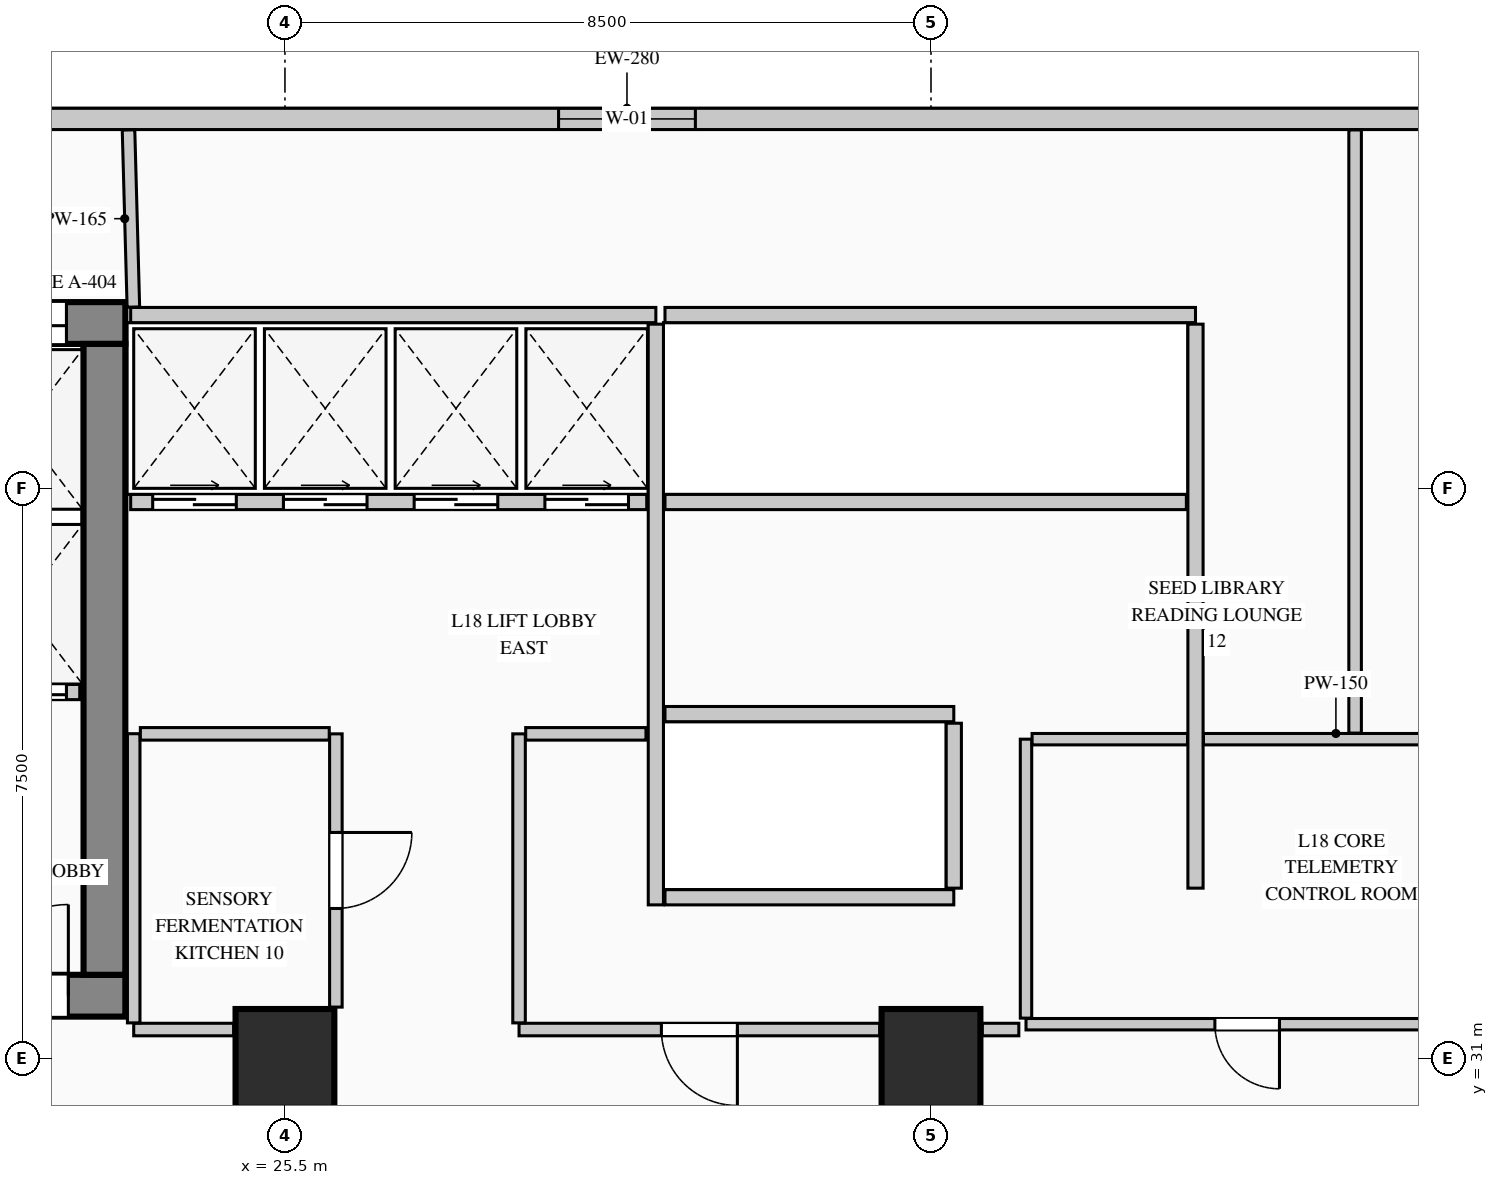
"""IFC4 building model, lengths in metres.
Left out: names, types, materials, properties, quantities, classifications, styles, units other than length and angle.
Written with IfcOpenShell. Run it as: python <this file> out.ifc"""

import sys

from ifc_helpers import new_model, si_unit, direction, frame, frame_2d, origin, origin_2d, place, context, subcontext, project, spatial, rectangle, extrude, element, fill, save


model = new_model("IFC4")
c1 = context("Model", 3, precision=1e-05, world=origin(), true_north=direction((0.0, 1.0)))
c2 = subcontext(c1, "Body", "Model", "MODEL_VIEW")
j1 = project(units=[si_unit("LENGTHUNIT", "METRE"), si_unit("PLANEANGLEUNIT", "RADIAN")], contexts=[c1])
p1 = place(None, origin())
s1 = spatial("IfcSite", under=j1, at=p1, CompositionType="ELEMENT")
p2 = place(p1, origin())
s2 = spatial("IfcBuilding", under=s1, at=p2, CompositionType="ELEMENT")
p3 = place(p2, frame((0.0, 0.0, 79.8)))
s3 = spatial("IfcBuildingStorey", under=s2, at=p3, CompositionType="ELEMENT", Elevation=79.8)
p4 = place(p3, frame((5.45, 40.675, 0.0), z_axis=(0.0, 0.0, 1.0), x_axis=(1.0, 0.0, 0.0)))
e1 = element("IfcWall", 1, at=p4, inside=s3, PredefinedType="SHEAR", context=c2, shape_type="SweptSolid", body=[
    extrude(rectangle(XDim=17.95, YDim=0.55, at=frame_2d((8.975, 0.0))), origin(), (0.0, 0.0, 1.0), 4.4),
])
p5 = place(p4, frame((15.995, 0.0, 0.0)))
e2 = element("IfcOpeningElement", 2, at=p5, cuts=e1, PredefinedType="OPENING", context=c2, shape_type="SweptSolid", body=[
    extrude(rectangle(XDim=1.18, YDim=2.25, at=frame_2d((0.59, 1.125))), frame((0.0, 0.285, 0.0), z_axis=(0.0, -1.0, 0.0), x_axis=(1.0, 0.0, 0.0)), (0.0, 0.0, 1.0), 0.57),
])
p6 = place(p3, frame((5.45, 31.825, 0.0), z_axis=(0.0, 0.0, 1.0), x_axis=(1.0, 0.0, 0.0)))
e3 = element("IfcWall", 3, at=p6, inside=s3, PredefinedType="SHEAR", context=c2, shape_type="SweptSolid", body=[
    extrude(rectangle(XDim=17.95, YDim=0.55, at=frame_2d((8.975, 0.0))), origin(), (0.0, 0.0, 1.0), 4.4),
])
p7 = place(p6, frame((3.2, 0.0, 0.0)))
e4 = element("IfcOpeningElement", 4, at=p7, cuts=e3, PredefinedType="OPENING", context=c2, shape_type="SweptSolid", body=[
    extrude(rectangle(XDim=1.2, YDim=2.2, at=frame_2d((0.6, 1.1))), frame((0.0, 0.285, 0.0), z_axis=(0.0, -1.0, 0.0), x_axis=(1.0, 0.0, 0.0)), (0.0, 0.0, 1.0), 0.57),
])
p8 = place(p6, frame((7.05, 0.0, 0.0)))
e5 = element("IfcOpeningElement", 5, at=p8, cuts=e3, PredefinedType="OPENING", context=c2, shape_type="SweptSolid", body=[
    extrude(rectangle(XDim=1.2, YDim=2.2, at=frame_2d((0.6, 1.1))), frame((0.0, 0.285, 0.0), z_axis=(0.0, -1.0, 0.0), x_axis=(1.0, 0.0, 0.0)), (0.0, 0.0, 1.0), 0.57),
])
p9 = place(p6, frame((8.9, 0.0, 0.0)))
e6 = element("IfcOpeningElement", 6, at=p9, cuts=e3, PredefinedType="OPENING", context=c2, shape_type="SweptSolid", body=[
    extrude(rectangle(XDim=1.15, YDim=2.2, at=frame_2d((0.575, 1.1))), frame((0.0, 0.285, 0.0), z_axis=(0.0, -1.0, 0.0), x_axis=(1.0, 0.0, 0.0)), (0.0, 0.0, 1.0), 0.57),
])
p10 = place(p6, frame((16.0, 0.0, 0.0)))
e7 = element("IfcOpeningElement", 7, at=p10, cuts=e3, PredefinedType="OPENING", context=c2, shape_type="SweptSolid", body=[
    extrude(rectangle(XDim=1.2, YDim=2.2, at=frame_2d((0.6, 1.1))), frame((0.0, 0.285, 0.0), z_axis=(0.0, -1.0, 0.0), x_axis=(1.0, 0.0, 0.0)), (0.0, 0.0, 1.0), 0.57),
])
p11 = place(p3, frame((23.125, 32.1, 0.0), z_axis=(0.0, 0.0, 1.0), x_axis=(0.0, 1.0, 0.0)))
e8 = element("IfcWall", 8, at=p11, inside=s3, PredefinedType="SHEAR", context=c2, shape_type="SweptSolid", body=[
    extrude(rectangle(XDim=8.3, YDim=0.55, at=frame_2d((4.15, 0.0))), origin(), (0.0, 0.0, 1.0), 4.4),
])
for number, where, z_axis, x_axis in (
    (9, (25.5, 31.0, 0.0), (0.0, 0.0, 1.0), (1.0, 0.0, 0.0)),
    (10, (34.0, 31.0, 0.0), (0.0, 0.0, 1.0), (1.0, 0.0, 0.0)),
):
    element("IfcColumn", number, at=place(p3, frame(where, z_axis=z_axis, x_axis=x_axis)), inside=s3, PredefinedType="COLUMN", context=c2, shape_type="SweptSolid", body=[
        extrude(rectangle(XDim=1.3, YDim=1.3, at=origin_2d()), origin(), (0.0, 0.0, 1.0), 4.4),
    ])
p12 = place(p3, frame((4.84, 43.36, 0.0), z_axis=(0.0, 0.0, 1.0), x_axis=(1.0, 0.0, 0.0)))
e11 = element("IfcWall", 11, at=p12, inside=s3, PredefinedType="STANDARD", context=c2, shape_type="SweptSolid", body=[
    extrude(rectangle(XDim=50.32, YDim=0.28, at=frame_2d((25.16, 0.0))), origin(), (0.0, 0.0, 1.0), 4.115),
])
p13 = place(p12, frame((24.26, 0.0, 0.9)))
e12 = element("IfcOpeningElement", 12, at=p13, cuts=e11, PredefinedType="OPENING", context=c2, shape_type="SweptSolid", body=[
    extrude(rectangle(XDim=1.8, YDim=2.1, at=frame_2d((0.9, 1.05))), frame((0.0, 0.15, 0.0), z_axis=(0.0, -1.0, 0.0), x_axis=(1.0, 0.0, 0.0)), (0.0, 0.0, 1.0), 0.3),
])
p14 = place(p3, frame((21.3, 35.82, 0.0), z_axis=(0.0, 0.0, 1.0), x_axis=(1.0, 0.0, 0.0)))
e13 = element("IfcWall", 13, at=p14, inside=s3, PredefinedType="PARTITIONING", context=c2, shape_type="SweptSolid", body=[
    extrude(rectangle(XDim=1.5, YDim=0.2, at=frame_2d((0.75, 0.0))), origin(), (0.0, 0.0, 1.0), 4.115),
])
p15 = place(p14, frame((0.145, 0.0, 0.0)))
e14 = element("IfcOpeningElement", 14, at=p15, cuts=e13, PredefinedType="OPENING", context=c2, shape_type="SweptSolid", body=[
    extrude(rectangle(XDim=1.18, YDim=2.25, at=frame_2d((0.59, 1.125))), frame((0.0, 0.11, 0.0), z_axis=(0.0, -1.0, 0.0), x_axis=(1.0, 0.0, 0.0)), (0.0, 0.0, 1.0), 0.22),
])
p16 = place(p3, frame((23.47, 40.78, 0.0), z_axis=(0.0, 0.0, 1.0), x_axis=(1.0, 0.0, 0.0)))
e15 = element("IfcWall", 15, at=p16, inside=s3, PredefinedType="PARTITIONING", context=c2, shape_type="SweptSolid", body=[
    extrude(rectangle(XDim=6.91, YDim=0.2, at=frame_2d((3.455, 0.0))), origin(), (0.0, 0.0, 1.0), 4.115),
])
p17 = place(p3, frame((30.38, 33.02, 0.0), z_axis=(0.0, 0.0, 1.0), x_axis=(0.0, 1.0, 0.0)))
e16 = element("IfcWall", 16, at=p17, inside=s3, PredefinedType="PARTITIONING", context=c2, shape_type="SweptSolid", body=[
    extrude(rectangle(XDim=7.64, YDim=0.2, at=frame_2d((3.82, 0.0))), origin(), (0.0, 0.0, 1.0), 4.115),
])
p18 = place(p3, frame((23.47, 38.32, 0.0), z_axis=(0.0, 0.0, 1.0), x_axis=(1.0, 0.0, 0.0)))
e17 = element("IfcWall", 17, at=p18, inside=s3, PredefinedType="PARTITIONING", context=c2, shape_type="SweptSolid", body=[
    extrude(rectangle(XDim=6.79, YDim=0.2, at=frame_2d((3.395, 0.0))), origin(), (0.0, 0.0, 1.0), 4.115),
])
p19 = place(p18, frame((0.29, 0.0, 0.0)))
e18 = element("IfcOpeningElement", 18, at=p19, cuts=e17, PredefinedType="OPENING", context=c2, shape_type="SweptSolid", body=[
    extrude(rectangle(XDim=1.1, YDim=2.2, at=frame_2d((0.55, 1.1))), frame((0.0, 0.11, 0.0), z_axis=(0.0, -1.0, 0.0), x_axis=(1.0, 0.0, 0.0)), (0.0, 0.0, 1.0), 0.22),
])
p20 = place(p18, frame((2.01, 0.0, 0.0)))
e19 = element("IfcOpeningElement", 19, at=p20, cuts=e17, PredefinedType="OPENING", context=c2, shape_type="SweptSolid", body=[
    extrude(rectangle(XDim=1.1, YDim=2.2, at=frame_2d((0.55, 1.1))), frame((0.0, 0.11, 0.0), z_axis=(0.0, -1.0, 0.0), x_axis=(1.0, 0.0, 0.0)), (0.0, 0.0, 1.0), 0.22),
])
p21 = place(p18, frame((3.73, 0.0, 0.0)))
e20 = element("IfcOpeningElement", 20, at=p21, cuts=e17, PredefinedType="OPENING", context=c2, shape_type="SweptSolid", body=[
    extrude(rectangle(XDim=1.1, YDim=2.2, at=frame_2d((0.55, 1.1))), frame((0.0, 0.11, 0.0), z_axis=(0.0, -1.0, 0.0), x_axis=(1.0, 0.0, 0.0)), (0.0, 0.0, 1.0), 0.22),
])
p22 = place(p18, frame((5.45, 0.0, 0.0)))
e21 = element("IfcOpeningElement", 21, at=p22, cuts=e17, PredefinedType="OPENING", context=c2, shape_type="SweptSolid", body=[
    extrude(rectangle(XDim=1.1, YDim=2.2, at=frame_2d((0.55, 1.1))), frame((0.0, 0.11, 0.0), z_axis=(0.0, -1.0, 0.0), x_axis=(1.0, 0.0, 0.0)), (0.0, 0.0, 1.0), 0.22),
])
p23 = place(p3, frame((30.5, 40.78, 0.0), z_axis=(0.0, 0.0, 1.0), x_axis=(1.0, 0.0, 0.0)))
e22 = element("IfcWall", 22, at=p23, inside=s3, PredefinedType="PARTITIONING", context=c2, shape_type="SweptSolid", body=[
    extrude(rectangle(XDim=6.98, YDim=0.2, at=frame_2d((3.49, 0.0))), origin(), (0.0, 0.0, 1.0), 4.115),
])
p24 = place(p3, frame((37.48, 33.24, 0.0), z_axis=(0.0, 0.0, 1.0), x_axis=(0.0, 1.0, 0.0)))
e23 = element("IfcWall", 23, at=p24, inside=s3, PredefinedType="PARTITIONING", context=c2, shape_type="SweptSolid", body=[
    extrude(rectangle(XDim=7.42, YDim=0.2, at=frame_2d((3.71, 0.0))), origin(), (0.0, 0.0, 1.0), 4.115),
])
p25 = place(p3, frame((30.5, 38.32, 0.0), z_axis=(0.0, 0.0, 1.0), x_axis=(1.0, 0.0, 0.0)))
e24 = element("IfcWall", 24, at=p25, inside=s3, PredefinedType="PARTITIONING", context=c2, shape_type="SweptSolid", body=[
    extrude(rectangle(XDim=6.86, YDim=0.2, at=frame_2d((3.43, 0.0))), origin(), (0.0, 0.0, 1.0), 4.115),
])
for number, where, z_axis, x_axis in (
    (25, (30.5, 35.53, 0.0), (0.0, 0.0, 1.0), (1.0, 0.0, 0.0)),
    (26, (30.5, 33.12, 0.0), (0.0, 0.0, 1.0), (1.0, 0.0, 0.0)),
):
    element("IfcWall", number, at=place(p3, frame(where, z_axis=z_axis, x_axis=x_axis)), inside=s3, PredefinedType="PARTITIONING", context=c2, shape_type="SweptSolid", body=[
        extrude(rectangle(XDim=3.8, YDim=0.2, at=frame_2d((1.9, 0.0))), origin(), (0.0, 0.0, 1.0), 4.115),
    ])
p26 = place(p3, frame((34.3, 33.24, 0.0), z_axis=(0.0, 0.0, 1.0), x_axis=(0.0, 1.0, 0.0)))
e27 = element("IfcWall", 27, at=p26, inside=s3, PredefinedType="PARTITIONING", context=c2, shape_type="SweptSolid", body=[
    extrude(rectangle(XDim=2.17, YDim=0.2, at=frame_2d((1.085, 0.0))), origin(), (0.0, 0.0, 1.0), 4.115),
])
p27 = place(p3, frame((41.07, 31.45, 0.0), z_axis=(0.0, 0.0, 1.0), x_axis=(-1.0, 0.0, 0.0)))
e28 = element("IfcWall", 28, at=p27, inside=s3, PredefinedType="PARTITIONING", context=c2, shape_type="SweptSolid", body=[
    extrude(rectangle(XDim=5.82, YDim=0.15, at=frame_2d((2.91, 0.0))), origin(), (0.0, 0.0, 1.0), 4.115),
])
p28 = place(p27, frame((2.485, 0.0, 0.0)))
e29 = element("IfcOpeningElement", 29, at=p28, cuts=e28, PredefinedType="OPENING", context=c2, shape_type="SweptSolid", body=[
    extrude(rectangle(XDim=0.85, YDim=2.1, at=frame_2d((0.425, 1.05))), frame((0.0, 0.085, 0.0), z_axis=(0.0, -1.0, 0.0), x_axis=(1.0, 0.0, 0.0)), (0.0, 0.0, 1.0), 0.17),
])
p29 = place(p3, frame((35.25, 31.53, 0.0), z_axis=(0.0, 0.0, 1.0), x_axis=(0.0, 1.0, 0.0)))
e30 = element("IfcWall", 30, at=p29, inside=s3, PredefinedType="PARTITIONING", context=c2, shape_type="SweptSolid", body=[
    extrude(rectangle(XDim=3.67, YDim=0.15, at=frame_2d((1.835, 0.0))), origin(), (0.0, 0.0, 1.0), 4.115),
])
p30 = place(p3, frame((35.33, 35.2, 0.0), z_axis=(0.0, 0.0, 1.0), x_axis=(1.0, 0.0, 0.0)))
e31 = element("IfcWall", 31, at=p30, inside=s3, PredefinedType="PARTITIONING", context=c2, shape_type="SweptSolid", body=[
    extrude(rectangle(XDim=2.045, YDim=0.15, at=frame_2d((1.022, 0.0))), origin(), (0.0, 0.0, 1.0), 4.115),
])
p31 = place(p3, frame((37.585, 35.2, 0.0), z_axis=(0.0, 0.0, 1.0), x_axis=(1.0, 0.0, 0.0)))
e32 = element("IfcWall", 32, at=p31, inside=s3, PredefinedType="PARTITIONING", context=c2, shape_type="SweptSolid", body=[
    extrude(rectangle(XDim=3.485, YDim=0.15, at=frame_2d((1.743, 0.0))), origin(), (0.0, 0.0, 1.0), 4.115),
])
p32 = place(p3, frame((26.17, 35.27, 0.0), z_axis=(0.0, 0.0, 1.0), x_axis=(0.0, -1.0, 0.0)))
e33 = element("IfcWall", 33, at=p32, inside=s3, PredefinedType="PARTITIONING", context=c2, shape_type="SweptSolid", body=[
    extrude(rectangle(XDim=3.595, YDim=0.165, at=frame_2d((1.797, 0.0))), origin(), (0.0, 0.0, 1.0), 4.115),
])
p33 = place(p32, frame((1.298, 0.0, 0.0)))
e34 = element("IfcOpeningElement", 34, at=p33, cuts=e33, PredefinedType="OPENING", context=c2, shape_type="SweptSolid", body=[
    extrude(rectangle(XDim=1.0, YDim=2.15, at=frame_2d((0.5, 1.075))), frame((0.0, 0.093, 0.0), z_axis=(0.0, -1.0, 0.0), x_axis=(1.0, 0.0, 0.0)), (0.0, 0.0, 1.0), 0.185),
])
p34 = place(p3, frame((24.825, 31.38, 0.0), z_axis=(0.0, 0.0, 1.0), x_axis=(-1.0, 0.0, 0.0)))
e35 = element("IfcWall", 35, at=p34, inside=s3, PredefinedType="PARTITIONING", context=c2, shape_type="SweptSolid", body=[
    extrude(rectangle(XDim=1.315, YDim=0.165, at=frame_2d((0.657, 0.0))), origin(), (0.0, 0.0, 1.0), 4.115),
])
p35 = place(p3, frame((23.51, 31.468, 0.0), z_axis=(0.0, 0.0, 1.0), x_axis=(0.0, 1.0, 0.0)))
e36 = element("IfcWall", 36, at=p35, inside=s3, PredefinedType="PARTITIONING", context=c2, shape_type="SweptSolid", body=[
    extrude(rectangle(XDim=3.804, YDim=0.165, at=frame_2d((1.902, 0.0))), origin(), (0.0, 0.0, 1.0), 4.115),
])
p36 = place(p3, frame((23.597, 35.27, 0.0), z_axis=(0.0, 0.0, 1.0), x_axis=(1.0, 0.0, 0.0)))
e37 = element("IfcWall", 37, at=p36, inside=s3, PredefinedType="PARTITIONING", context=c2, shape_type="SweptSolid", body=[
    extrude(rectangle(XDim=2.485, YDim=0.165, at=frame_2d((1.243, 0.0))), origin(), (0.0, 0.0, 1.0), 4.115),
])
p37 = place(p3, frame((39.58, 35.28, 0.0), z_axis=(0.0, 0.0, 1.0), x_axis=(0.0, 1.0, 0.0)))
e38 = element("IfcWall", 38, at=p37, inside=s3, PredefinedType="PARTITIONING", context=c2, shape_type="SweptSolid", body=[
    extrude(rectangle(XDim=7.935, YDim=0.165, at=frame_2d((3.968, 0.0))), origin(), (0.0, 0.0, 1.0), 4.115),
])
p38 = place(p3, frame((35.156, 31.38, 0.0), z_axis=(0.0, 0.0, 1.0), x_axis=(-1.0, 0.0, 0.0)))
e39 = element("IfcWall", 39, at=p38, inside=s3, PredefinedType="PARTITIONING", context=c2, shape_type="SweptSolid", body=[
    extrude(rectangle(XDim=0.48, YDim=0.165, at=frame_2d((0.24, 0.0))), origin(), (0.0, 0.0, 1.0), 4.115),
])
p39 = place(p3, frame((33.325, 31.38, 0.0), z_axis=(0.0, 0.0, 1.0), x_axis=(-1.0, 0.0, 0.0)))
e40 = element("IfcWall", 40, at=p39, inside=s3, PredefinedType="PARTITIONING", context=c2, shape_type="SweptSolid", body=[
    extrude(rectangle(XDim=4.745, YDim=0.165, at=frame_2d((2.373, 0.0))), origin(), (0.0, 0.0, 1.0), 4.115),
])
p40 = place(p39, frame((1.873, 0.0, 0.0)))
e41 = element("IfcOpeningElement", 41, at=p40, cuts=e40, PredefinedType="OPENING", context=c2, shape_type="SweptSolid", body=[
    extrude(rectangle(XDim=1.0, YDim=2.15, at=frame_2d((0.5, 1.075))), frame((0.0, 0.093, 0.0), z_axis=(0.0, -1.0, 0.0), x_axis=(1.0, 0.0, 0.0)), (0.0, 0.0, 1.0), 0.185),
])
p41 = place(p3, frame((28.58, 31.468, 0.0), z_axis=(0.0, 0.0, 1.0), x_axis=(0.0, 1.0, 0.0)))
e42 = element("IfcWall", 42, at=p41, inside=s3, PredefinedType="PARTITIONING", context=c2, shape_type="SweptSolid", body=[
    extrude(rectangle(XDim=3.802, YDim=0.165, at=frame_2d((1.901, 0.0))), origin(), (0.0, 0.0, 1.0), 4.115),
])
p42 = place(p3, frame((28.667, 35.27, 0.0), z_axis=(0.0, 0.0, 1.0), x_axis=(1.0, 0.0, 0.0)))
e43 = element("IfcWall", 43, at=p42, inside=s3, PredefinedType="PARTITIONING", context=c2, shape_type="SweptSolid", body=[
    extrude(rectangle(XDim=1.583, YDim=0.165, at=frame_2d((0.791, 0.0))), origin(), (0.0, 0.0, 1.0), 4.115),
])
p43 = place(p3, frame((23.506, 40.885, 0.0), z_axis=(0.0, 0.0, 1.0), x_axis=(-0.027441464163, 0.999623412113, 0.0)))
e44 = element("IfcWall", 44, at=p43, inside=s3, PredefinedType="PARTITIONING", context=c2, shape_type="SweptSolid", body=[
    extrude(rectangle(XDim=2.331, YDim=0.165, at=frame_2d((1.166, 0.0))), origin(), (0.0, 0.0, 1.0), 4.115),
])
p44 = place(p13, origin())
e45 = element("IfcWindow", 45, at=p44, inside=s3, PartitioningType="SINGLE_PANEL", PredefinedType="WINDOW", context=c2, shape_type="SweptSolid", body=[
    extrude(rectangle(XDim=1.8, YDim=2.1, at=frame_2d((0.9, 1.05))), frame((0.0, 0.03, 0.0), z_axis=(0.0, -1.0, 0.0), x_axis=(1.0, 0.0, 0.0)), (0.0, 0.0, 1.0), 0.06),
])
fill(e12, e45)
p45 = place(p10, origin())
e46 = element("IfcDoor", 46, at=p45, inside=s3, OperationType="SINGLE_SWING_RIGHT", PredefinedType="DOOR", context=c2, shape_type="SweptSolid", body=[
    extrude(rectangle(XDim=1.2, YDim=2.2, at=frame_2d((0.6, 1.1))), frame((0.0, 0.025, 0.0), z_axis=(0.0, -1.0, 0.0), x_axis=(1.0, 0.0, 0.0)), (0.0, 0.0, 1.0), 0.05),
])
fill(e7, e46)
p46 = place(p5, origin())
e47 = element("IfcDoor", 47, at=p46, inside=s3, OperationType="DOUBLE_DOOR_SLIDING", PredefinedType="DOOR", context=c2, shape_type="SweptSolid", body=[
    extrude(rectangle(XDim=1.18, YDim=2.25, at=frame_2d((0.59, 1.125))), frame((0.0, 0.025, 0.0), z_axis=(0.0, -1.0, 0.0), x_axis=(1.0, 0.0, 0.0)), (0.0, 0.0, 1.0), 0.05),
])
fill(e2, e47)
p47 = place(p15, origin())
e48 = element("IfcDoor", 48, at=p47, inside=s3, OperationType="DOUBLE_DOOR_SLIDING", PredefinedType="DOOR", context=c2, shape_type="SweptSolid", body=[
    extrude(rectangle(XDim=1.18, YDim=2.25, at=frame_2d((0.59, 1.125))), frame((0.0, 0.025, 0.0), z_axis=(0.0, -1.0, 0.0), x_axis=(1.0, 0.0, 0.0)), (0.0, 0.0, 1.0), 0.05),
])
fill(e14, e48)
p48 = place(p19, origin())
e49 = element("IfcDoor", 49, at=p48, inside=s3, OperationType="DOUBLE_DOOR_SLIDING", PredefinedType="DOOR", context=c2, shape_type="SweptSolid", body=[
    extrude(rectangle(XDim=1.1, YDim=2.2, at=frame_2d((0.55, 1.1))), frame((0.0, 0.025, 0.0), z_axis=(0.0, -1.0, 0.0), x_axis=(1.0, 0.0, 0.0)), (0.0, 0.0, 1.0), 0.05),
])
fill(e18, e49)
p49 = place(p20, origin())
e50 = element("IfcDoor", 50, at=p49, inside=s3, OperationType="DOUBLE_DOOR_SLIDING", PredefinedType="DOOR", context=c2, shape_type="SweptSolid", body=[
    extrude(rectangle(XDim=1.1, YDim=2.2, at=frame_2d((0.55, 1.1))), frame((0.0, 0.025, 0.0), z_axis=(0.0, -1.0, 0.0), x_axis=(1.0, 0.0, 0.0)), (0.0, 0.0, 1.0), 0.05),
])
fill(e19, e50)
p50 = place(p21, origin())
e51 = element("IfcDoor", 51, at=p50, inside=s3, OperationType="DOUBLE_DOOR_SLIDING", PredefinedType="DOOR", context=c2, shape_type="SweptSolid", body=[
    extrude(rectangle(XDim=1.1, YDim=2.2, at=frame_2d((0.55, 1.1))), frame((0.0, 0.025, 0.0), z_axis=(0.0, -1.0, 0.0), x_axis=(1.0, 0.0, 0.0)), (0.0, 0.0, 1.0), 0.05),
])
fill(e20, e51)
p51 = place(p22, origin())
e52 = element("IfcDoor", 52, at=p51, inside=s3, OperationType="DOUBLE_DOOR_SLIDING", PredefinedType="DOOR", context=c2, shape_type="SweptSolid", body=[
    extrude(rectangle(XDim=1.1, YDim=2.2, at=frame_2d((0.55, 1.1))), frame((0.0, 0.025, 0.0), z_axis=(0.0, -1.0, 0.0), x_axis=(1.0, 0.0, 0.0)), (0.0, 0.0, 1.0), 0.05),
])
fill(e21, e52)
p52 = place(p28, origin())
e53 = element("IfcDoor", 53, at=p52, inside=s3, OperationType="SINGLE_SWING_LEFT", PredefinedType="DOOR", context=c2, shape_type="SweptSolid", body=[
    extrude(rectangle(XDim=0.85, YDim=2.1, at=frame_2d((0.425, 1.05))), frame((0.0, 0.025, 0.0), z_axis=(0.0, -1.0, 0.0), x_axis=(1.0, 0.0, 0.0)), (0.0, 0.0, 1.0), 0.05),
])
fill(e29, e53)
p53 = place(p33, origin())
e54 = element("IfcDoor", 54, at=p53, inside=s3, OperationType="SINGLE_SWING_LEFT", PredefinedType="DOOR", context=c2, shape_type="SweptSolid", body=[
    extrude(rectangle(XDim=1.0, YDim=2.15, at=frame_2d((0.5, 1.075))), frame((0.0, 0.025, 0.0), z_axis=(0.0, -1.0, 0.0), x_axis=(1.0, 0.0, 0.0)), (0.0, 0.0, 1.0), 0.05),
])
fill(e34, e54)
p54 = place(p40, origin())
e55 = element("IfcDoor", 55, at=p54, inside=s3, OperationType="SINGLE_SWING_LEFT", PredefinedType="DOOR", context=c2, shape_type="SweptSolid", body=[
    extrude(rectangle(XDim=1.0, YDim=2.15, at=frame_2d((0.5, 1.075))), frame((0.0, 0.025, 0.0), z_axis=(0.0, -1.0, 0.0), x_axis=(1.0, 0.0, 0.0)), (0.0, 0.0, 1.0), 0.05),
])
fill(e41, e55)
save(model, sys.argv[1])
